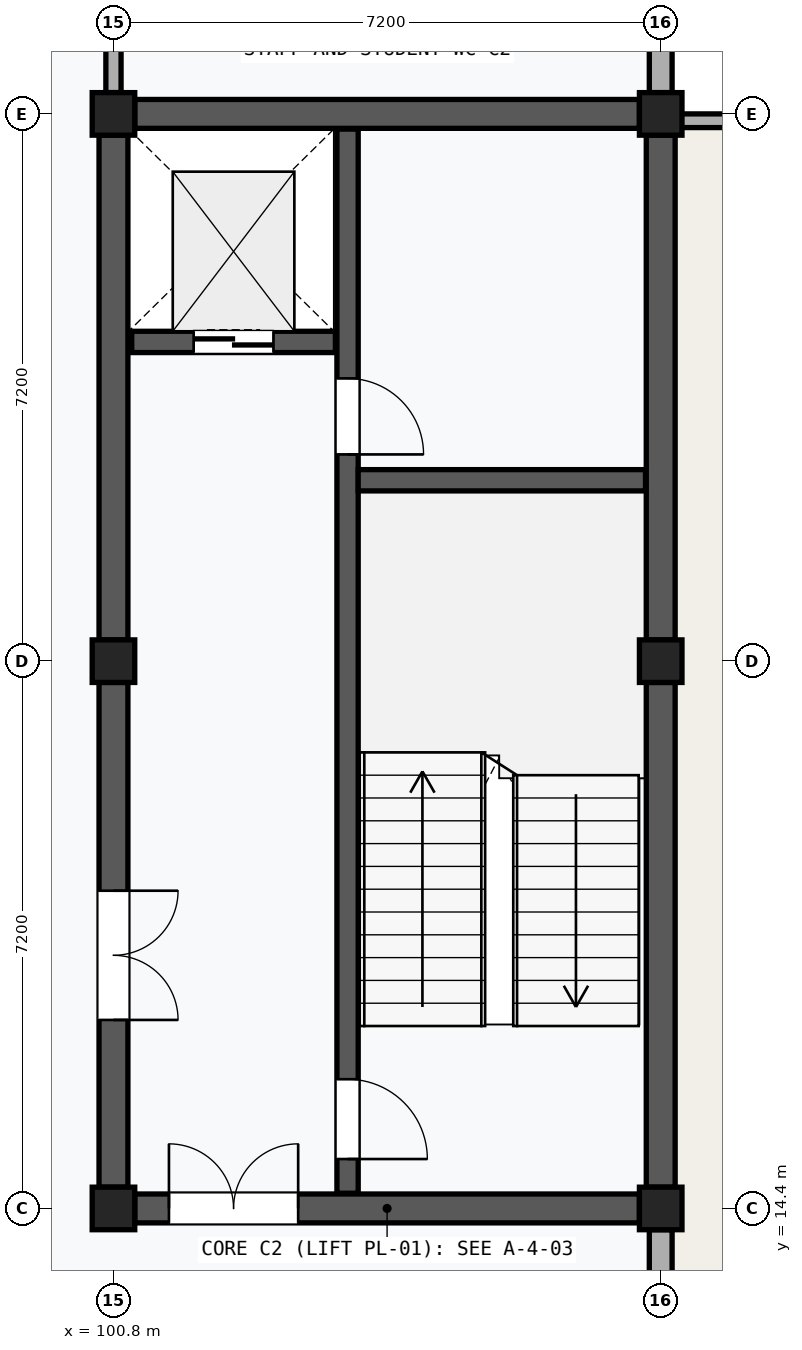
"""IFC4 building model, lengths in metres.
Left out: names, types, materials, properties, quantities, classifications, styles, units other than length and angle.
Written with IfcOpenShell. Run it as: python <this file> out.ifc"""

import sys

from ifc_helpers import new_model, si_unit, direction, frame, frame_2d, origin, origin_2d, place, context, subcontext, project, spatial, rectangle, extrude, element, fill, save


model = new_model("IFC4")
c1 = context("Model", 3, precision=1e-05, world=origin(), true_north=direction((0.0, 1.0)))
c2 = subcontext(c1, "Body", "Model", "MODEL_VIEW")
j1 = project(units=[si_unit("LENGTHUNIT", "METRE"), si_unit("PLANEANGLEUNIT", "RADIAN")], contexts=[c1])
p1 = place(None, origin())
s1 = spatial("IfcSite", under=j1, at=p1, CompositionType="ELEMENT")
p2 = place(p1, origin())
s2 = spatial("IfcBuilding", under=s1, at=p2, CompositionType="ELEMENT")
p3 = place(p2, frame((0.0, 0.0, 42.8)))
s3 = spatial("IfcBuildingStorey", under=s2, at=p3, CompositionType="ELEMENT", Elevation=42.8)
for number, where, z_axis, x_axis in (
    (1, (100.8, 14.4, 0.0), (0.0, 0.0, 1.0), (1.0, 0.0, 0.0)),
    (2, (100.8, 21.6, 0.0), (0.0, 0.0, 1.0), (1.0, 0.0, 0.0)),
    (3, (100.8, 28.8, 0.0), (0.0, 0.0, 1.0), (1.0, 0.0, 0.0)),
    (4, (108.0, 14.4, 0.0), (0.0, 0.0, 1.0), (1.0, 0.0, 0.0)),
    (5, (108.0, 21.6, 0.0), (0.0, 0.0, 1.0), (1.0, 0.0, 0.0)),
    (6, (108.0, 28.8, 0.0), (0.0, 0.0, 1.0), (1.0, 0.0, 0.0)),
):
    element("IfcColumn", number, at=place(p3, frame(where, z_axis=z_axis, x_axis=x_axis)), inside=s3, PredefinedType="COLUMN", context=c2, shape_type="SweptSolid", body=[
        extrude(rectangle(XDim=0.56, YDim=0.56, at=origin_2d()), origin(), (0.0, 0.0, 1.0), 4.0),
    ])
p4 = place(p3, frame((108.0, 7.46, 0.0), z_axis=(0.0, 0.0, 1.0), x_axis=(0.0, 1.0, 0.0)))
e7 = element("IfcWall", 7, at=p4, inside=s3, PredefinedType="SOLIDWALL", context=c2, shape_type="SweptSolid", body=[
    extrude(rectangle(XDim=6.66, YDim=0.3, at=frame_2d((3.33, 0.0))), origin(), (0.0, 0.0, 1.0), 3.18),
])
p5 = place(p4, frame((2.58, 0.0, 1.1)))
e8 = element("IfcOpeningElement", 8, at=p5, cuts=e7, PredefinedType="OPENING", context=c2, shape_type="SweptSolid", body=[
    extrude(rectangle(XDim=1.5, YDim=1.35, at=frame_2d((0.75, 0.675))), frame((0.0, 0.162, 0.0), z_axis=(0.0, -1.0, 0.0), x_axis=(1.0, 0.0, 0.0)), (0.0, 0.0, 1.0), 0.324),
])
p6 = place(p3, frame((108.0, 29.08, 0.0), z_axis=(0.0, 0.0, 1.0), x_axis=(0.0, 1.0, 0.0)))
e9 = element("IfcWall", 9, at=p6, inside=s3, PredefinedType="SOLIDWALL", context=c2, shape_type="SweptSolid", body=[
    extrude(rectangle(XDim=6.66, YDim=0.3, at=frame_2d((3.33, 0.0))), origin(), (0.0, 0.0, 1.0), 3.18),
])
p7 = place(p3, frame((108.09, 28.71, 0.0), z_axis=(0.0, 0.0, 1.0), x_axis=(1.0, 0.0, 0.0)))
e10 = element("IfcWall", 10, at=p7, inside=s3, PredefinedType="PARAPET", context=c2, shape_type="SweptSolid", body=[
    extrude(rectangle(XDim=7.02, YDim=0.18, at=frame_2d((3.51, 0.0))), origin(), (0.0, 0.0, 1.0), 0.95),
])
p8 = place(p3, frame((100.8, 14.68, 0.0), z_axis=(0.0, 0.0, 1.0), x_axis=(0.0, 1.0, 0.0)))
e11 = element("IfcWall", 11, at=p8, inside=s3, PredefinedType="SHEAR", context=c2, shape_type="SweptSolid", body=[
    extrude(rectangle(XDim=6.64, YDim=0.38, at=frame_2d((3.32, 0.0))), origin(), (0.0, 0.0, 1.0), 3.02),
])
p9 = place(p8, frame((2.2, 0.0, 0.0)))
e12 = element("IfcOpeningElement", 12, at=p9, cuts=e11, PredefinedType="OPENING", context=c2, shape_type="SweptSolid", body=[
    extrude(rectangle(XDim=1.7, YDim=2.25, at=frame_2d((0.85, 1.125))), frame((0.0, 0.202, 0.0), z_axis=(0.0, -1.0, 0.0), x_axis=(1.0, 0.0, 0.0)), (0.0, 0.0, 1.0), 0.404),
])
p10 = place(p3, frame((100.8, 21.88, 0.0), z_axis=(0.0, 0.0, 1.0), x_axis=(0.0, 1.0, 0.0)))
e13 = element("IfcWall", 13, at=p10, inside=s3, PredefinedType="SHEAR", context=c2, shape_type="SweptSolid", body=[
    extrude(rectangle(XDim=6.64, YDim=0.38, at=frame_2d((3.32, 0.0))), origin(), (0.0, 0.0, 1.0), 3.02),
])
for number, where, z_axis, x_axis in (
    (14, (108.0, 14.68, 0.0), (0.0, 0.0, 1.0), (0.0, 1.0, 0.0)),
    (15, (108.0, 21.88, 0.0), (0.0, 0.0, 1.0), (0.0, 1.0, 0.0)),
):
    element("IfcWall", number, at=place(p3, frame(where, z_axis=z_axis, x_axis=x_axis)), inside=s3, PredefinedType="SHEAR", context=c2, shape_type="SweptSolid", body=[
        extrude(rectangle(XDim=6.64, YDim=0.38, at=frame_2d((3.32, 0.0))), origin(), (0.0, 0.0, 1.0), 3.18),
    ])
p11 = place(p3, frame((101.08, 14.4, 0.0), z_axis=(0.0, 0.0, 1.0), x_axis=(1.0, 0.0, 0.0)))
e16 = element("IfcWall", 16, at=p11, inside=s3, PredefinedType="SHEAR", context=c2, shape_type="SweptSolid", body=[
    extrude(rectangle(XDim=6.64, YDim=0.38, at=frame_2d((3.32, 0.0))), origin(), (0.0, 0.0, 1.0), 3.02),
])
p12 = place(p11, frame((0.45, 0.0, 0.0)))
e17 = element("IfcOpeningElement", 17, at=p12, cuts=e16, PredefinedType="OPENING", context=c2, shape_type="SweptSolid", body=[
    extrude(rectangle(XDim=1.7, YDim=2.25, at=frame_2d((0.85, 1.125))), frame((0.0, 0.202, 0.0), z_axis=(0.0, -1.0, 0.0), x_axis=(1.0, 0.0, 0.0)), (0.0, 0.0, 1.0), 0.404),
])
p13 = place(p3, frame((101.08, 28.8, 0.0), z_axis=(0.0, 0.0, 1.0), x_axis=(1.0, 0.0, 0.0)))
e18 = element("IfcWall", 18, at=p13, inside=s3, PredefinedType="SHEAR", context=c2, shape_type="SweptSolid", body=[
    extrude(rectangle(XDim=6.64, YDim=0.38, at=frame_2d((3.32, 0.0))), origin(), (0.0, 0.0, 1.0), 3.02),
])
p14 = place(p3, frame((103.88, 14.6, 0.0), z_axis=(0.0, 0.0, 1.0), x_axis=(0.0, 1.0, 0.0)))
e19 = element("IfcWall", 19, at=p14, inside=s3, PredefinedType="SHEAR", context=c2, shape_type="SweptSolid", body=[
    extrude(rectangle(XDim=14.0, YDim=0.28, at=frame_2d((7.0, 0.0))), origin(), (0.0, 0.0, 1.0), 3.75),
])
p15 = place(p14, frame((0.45, 0.0, 0.0)))
e20 = element("IfcOpeningElement", 20, at=p15, cuts=e19, PredefinedType="OPENING", context=c2, shape_type="SweptSolid", body=[
    extrude(rectangle(XDim=1.05, YDim=2.15, at=frame_2d((0.525, 1.075))), frame((0.0, 0.152, 0.0), z_axis=(0.0, -1.0, 0.0), x_axis=(1.0, 0.0, 0.0)), (0.0, 0.0, 1.0), 0.304),
])
p16 = place(p14, frame((9.72, 0.0, 0.0)))
e21 = element("IfcOpeningElement", 21, at=p16, cuts=e19, PredefinedType="OPENING", context=c2, shape_type="SweptSolid", body=[
    extrude(rectangle(XDim=1.0, YDim=2.15, at=frame_2d((0.5, 1.075))), frame((0.0, 0.152, 0.0), z_axis=(0.0, -1.0, 0.0), x_axis=(1.0, 0.0, 0.0)), (0.0, 0.0, 1.0), 0.304),
])
p17 = place(p3, frame((104.02, 23.98, 0.0), z_axis=(0.0, 0.0, 1.0), x_axis=(1.0, 0.0, 0.0)))
e22 = element("IfcWall", 22, at=p17, inside=s3, PredefinedType="SHEAR", context=c2, shape_type="SweptSolid", body=[
    extrude(rectangle(XDim=3.78, YDim=0.28, at=frame_2d((1.89, 0.0))), origin(), (0.0, 0.0, 1.0), 3.75),
])
p18 = place(p3, frame((101.04, 25.8, 0.0), z_axis=(0.0, 0.0, 1.0), x_axis=(1.0, 0.0, 0.0)))
e23 = element("IfcWall", 23, at=p18, inside=s3, PredefinedType="SHEAR", context=c2, shape_type="SweptSolid", body=[
    extrude(rectangle(XDim=2.68, YDim=0.28, at=frame_2d((1.34, 0.0))), origin(), (0.0, 0.0, 1.0), 3.75),
])
p19 = place(p18, frame((0.815, 0.0, 0.0)))
e24 = element("IfcOpeningElement", 24, at=p19, cuts=e23, PredefinedType="OPENING", context=c2, shape_type="SweptSolid", body=[
    extrude(rectangle(XDim=1.05, YDim=2.2, at=frame_2d((0.525, 1.1))), frame((0.0, 0.152, 0.0), z_axis=(0.0, -1.0, 0.0), x_axis=(1.0, 0.0, 0.0)), (0.0, 0.0, 1.0), 0.304),
])
p20 = place(p3, frame((100.8, 29.08, 0.0), z_axis=(0.0, 0.0, 1.0), x_axis=(0.0, 1.0, 0.0)))
e25 = element("IfcWall", 25, at=p20, inside=s3, PredefinedType="PARTITIONING", context=c2, shape_type="SweptSolid", body=[
    extrude(rectangle(XDim=6.64, YDim=0.2, at=frame_2d((3.32, 0.0))), origin(), (0.0, 0.0, 1.0), 3.02),
])
p21 = place(p20, frame((2.8, 0.0, 0.0)))
e26 = element("IfcOpeningElement", 26, at=p21, cuts=e25, PredefinedType="OPENING", context=c2, shape_type="SweptSolid", body=[
    extrude(rectangle(XDim=1.04, YDim=2.14, at=frame_2d((0.52, 1.07))), frame((0.0, 0.112, 0.0), z_axis=(0.0, -1.0, 0.0), x_axis=(1.0, 0.0, 0.0)), (0.0, 0.0, 1.0), 0.224),
])
p22 = place(p9, frame((1.7, 0.0, 0.0), z_axis=(0.0, 0.0, 1.0), x_axis=(-1.0, 0.0, 0.0)))
e27 = element("IfcDoor", 27, at=p22, inside=s3, OperationType="DOUBLE_DOOR_SINGLE_SWING", PredefinedType="DOOR", context=c2, shape_type="SweptSolid", body=[
    extrude(rectangle(XDim=1.7, YDim=2.25, at=frame_2d((0.85, 1.125))), frame((0.0, 0.025, 0.0), z_axis=(0.0, -1.0, 0.0), x_axis=(1.0, 0.0, 0.0)), (0.0, 0.0, 1.0), 0.05),
])
fill(e12, e27)
p23 = place(p12, origin())
e28 = element("IfcDoor", 28, at=p23, inside=s3, OperationType="DOUBLE_DOOR_SINGLE_SWING", PredefinedType="DOOR", context=c2, shape_type="SweptSolid", body=[
    extrude(rectangle(XDim=1.7, YDim=2.25, at=frame_2d((0.85, 1.125))), frame((0.0, 0.025, 0.0), z_axis=(0.0, -1.0, 0.0), x_axis=(1.0, 0.0, 0.0)), (0.0, 0.0, 1.0), 0.05),
])
fill(e17, e28)
p24 = place(p15, frame((1.05, 0.0, 0.0), z_axis=(0.0, 0.0, 1.0), x_axis=(-1.0, 0.0, 0.0)))
e29 = element("IfcDoor", 29, at=p24, inside=s3, OperationType="SINGLE_SWING_RIGHT", PredefinedType="DOOR", context=c2, shape_type="SweptSolid", body=[
    extrude(rectangle(XDim=1.05, YDim=2.15, at=frame_2d((0.525, 1.075))), frame((0.0, 0.025, 0.0), z_axis=(0.0, -1.0, 0.0), x_axis=(1.0, 0.0, 0.0)), (0.0, 0.0, 1.0), 0.05),
])
fill(e20, e29)
p25 = place(p16, frame((1.0, 0.0, 0.0), z_axis=(0.0, 0.0, 1.0), x_axis=(-1.0, 0.0, 0.0)))
e30 = element("IfcDoor", 30, at=p25, inside=s3, OperationType="SINGLE_SWING_RIGHT", PredefinedType="DOOR", context=c2, shape_type="SweptSolid", body=[
    extrude(rectangle(XDim=1.0, YDim=2.15, at=frame_2d((0.5, 1.075))), frame((0.0, 0.025, 0.0), z_axis=(0.0, -1.0, 0.0), x_axis=(1.0, 0.0, 0.0)), (0.0, 0.0, 1.0), 0.05),
])
fill(e21, e30)
p26 = place(p19, frame((1.05, 0.0, 0.0), z_axis=(0.0, 0.0, 1.0), x_axis=(-1.0, 0.0, 0.0)))
e31 = element("IfcDoor", 31, at=p26, inside=s3, OperationType="DOUBLE_DOOR_SLIDING", PredefinedType="DOOR", context=c2, shape_type="SweptSolid", body=[
    extrude(rectangle(XDim=1.05, YDim=2.2, at=frame_2d((0.525, 1.1))), frame((0.0, 0.025, 0.0), z_axis=(0.0, -1.0, 0.0), x_axis=(1.0, 0.0, 0.0)), (0.0, 0.0, 1.0), 0.05),
])
fill(e24, e31)
save(model, sys.argv[1])
